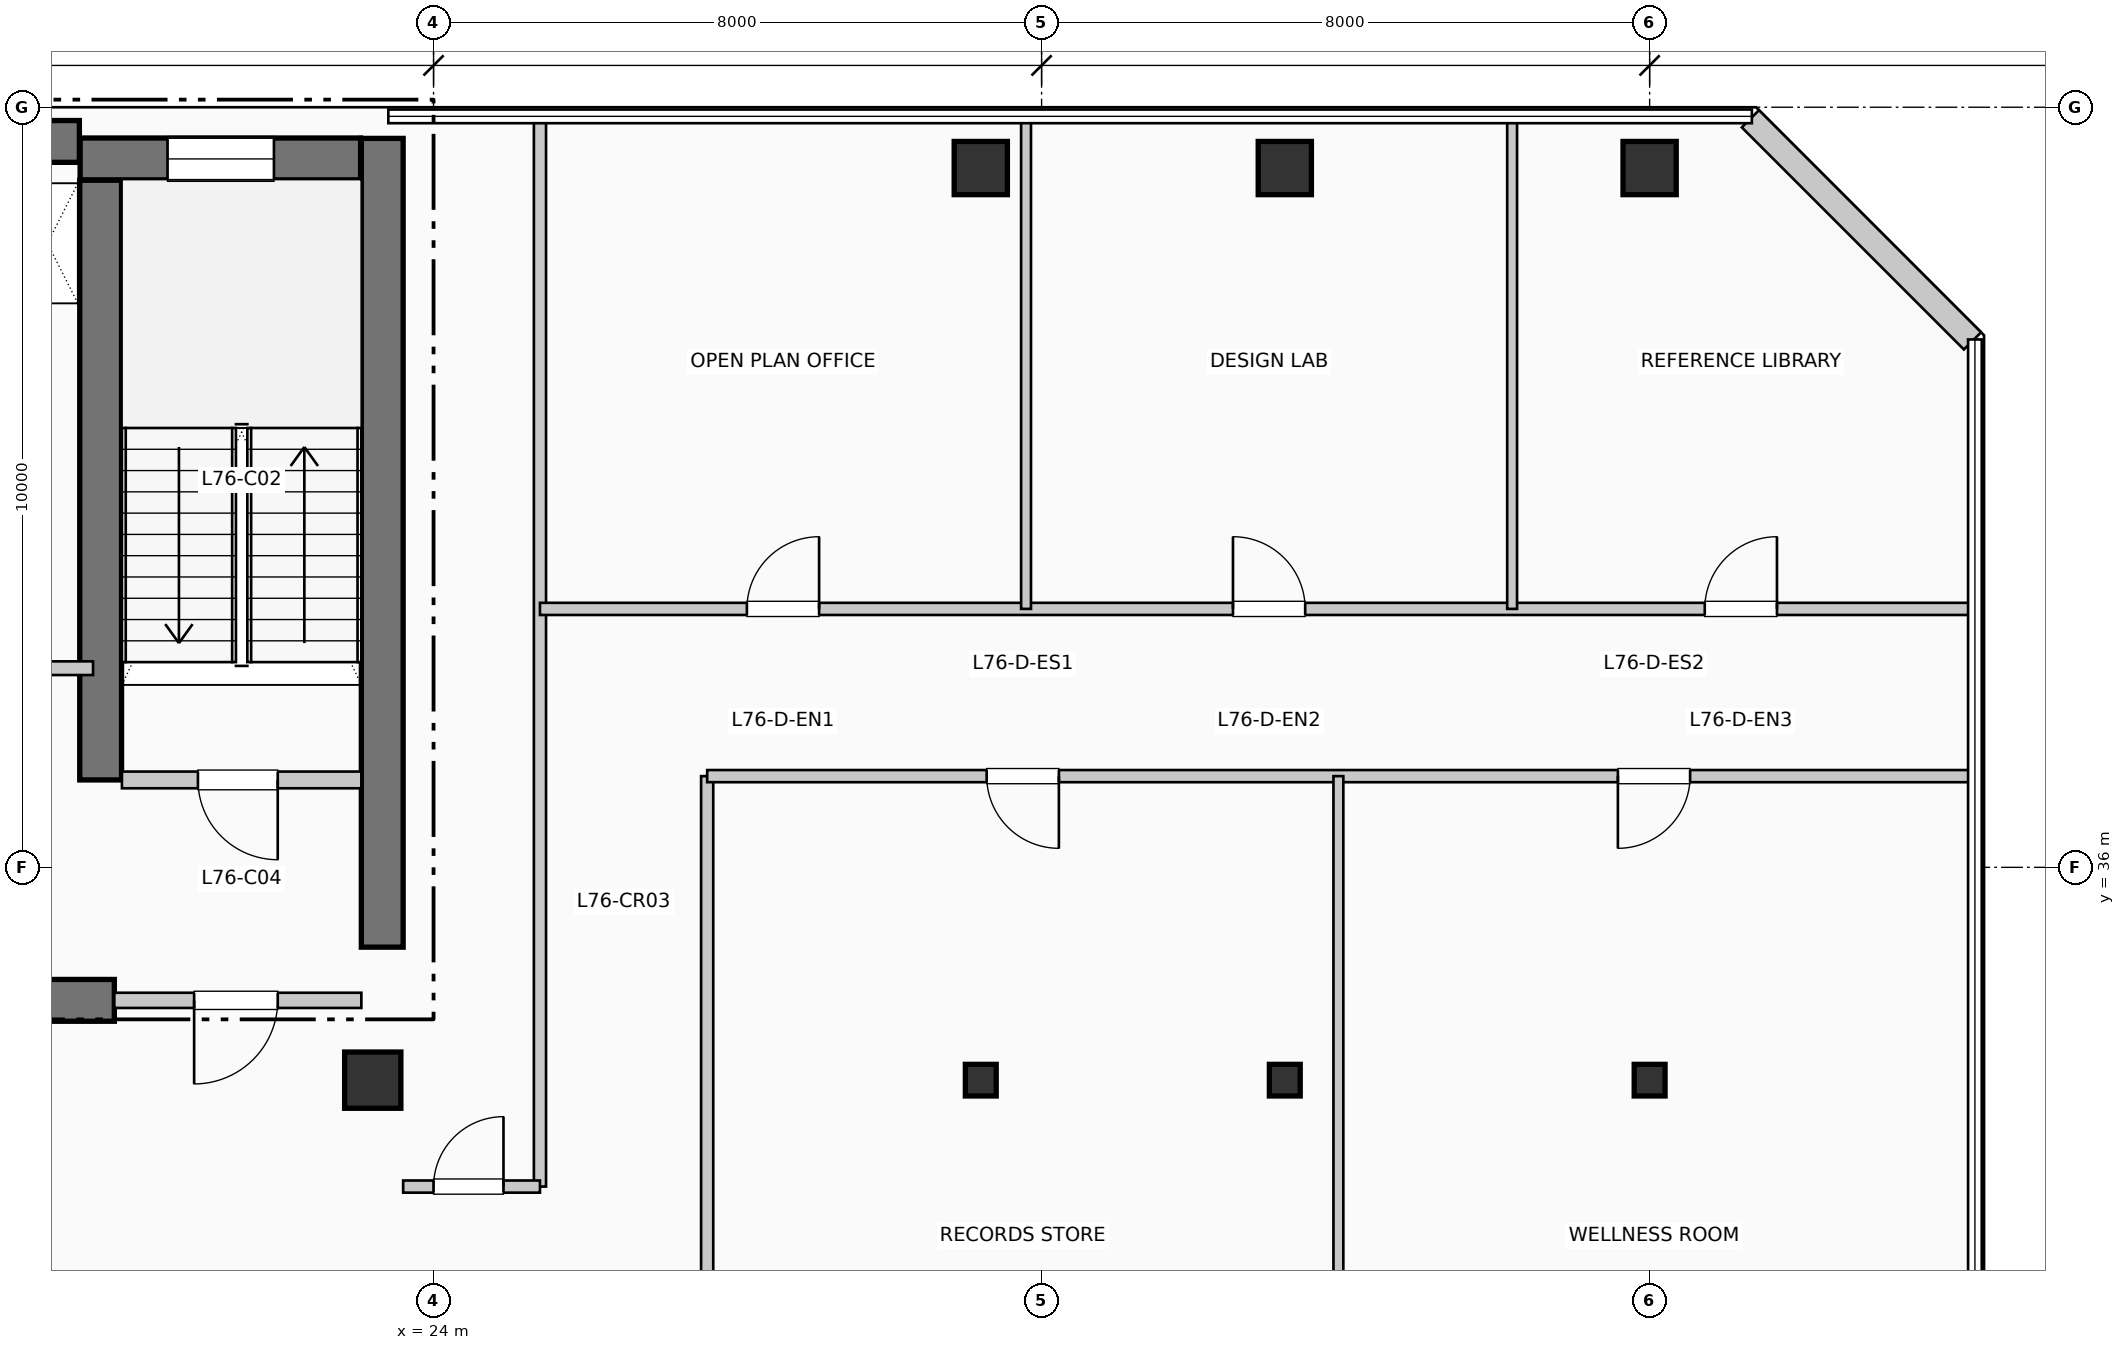
"""IFC4 building model, lengths in metres.
Left out: names, types, materials, properties, quantities, classifications, styles, units other than length and angle.
Written with IfcOpenShell. Run it as: python <this file> out.ifc"""

import sys

from ifc_helpers import new_model, si_unit, direction, frame, frame_2d, origin, origin_2d, place, context, subcontext, project, spatial, rectangle, i_section, extrude, element, fill, save


model = new_model("IFC4")
c1 = context("Model", 3, precision=1e-05, world=origin(), true_north=direction((0.0, 1.0)))
c2 = subcontext(c1, "Body", "Model", "MODEL_VIEW")
j1 = project(units=[si_unit("LENGTHUNIT", "METRE"), si_unit("PLANEANGLEUNIT", "RADIAN")], contexts=[c1])
p1 = place(None, origin())
s1 = spatial("IfcSite", under=j1, at=p1, CompositionType="ELEMENT")
p2 = place(p1, origin())
s2 = spatial("IfcBuilding", under=s1, at=p2, CompositionType="ELEMENT")
p3 = place(p2, frame((0.0, 0.0, 311.85)))
s3 = spatial("IfcBuildingStorey", under=s2, at=p3, CompositionType="ELEMENT", Elevation=311.85)
p4 = place(p3, frame((5.36, 45.55, 0.0), z_axis=(0.0, 0.0, 1.0), x_axis=(1.0, 0.0, 0.0)))
e1 = element("IfcWall", 1, at=p4, inside=s3, PredefinedType="SHEAR", context=c2, shape_type="SweptSolid", body=[
    extrude(rectangle(XDim=13.98, YDim=0.55, at=frame_2d((6.99, 0.0))), origin(), (0.0, 0.0, 1.0), 3.96),
])
p5 = place(p3, frame((23.325, 34.95, 0.0), z_axis=(0.0, 0.0, 1.0), x_axis=(0.0, 1.0, 0.0)))
e2 = element("IfcWall", 2, at=p5, inside=s3, PredefinedType="SHEAR", context=c2, shape_type="SweptSolid", body=[
    extrude(rectangle(XDim=10.64, YDim=0.55, at=frame_2d((5.32, 0.0))), origin(), (0.0, 0.0, 1.0), 3.96),
])
p6 = place(p3, frame((13.68, 34.25, 0.0), z_axis=(0.0, 0.0, 1.0), x_axis=(1.0, 0.0, 0.0)))
e3 = element("IfcWall", 3, at=p6, inside=s3, PredefinedType="SHEAR", context=c2, shape_type="SweptSolid", body=[
    extrude(rectangle(XDim=6.12, YDim=0.55, at=frame_2d((3.06, 0.0))), origin(), (0.0, 0.0, 1.0), 3.96),
])
p7 = place(p3, frame((19.62, 37.15, 0.0), z_axis=(0.0, 0.0, 1.0), x_axis=(0.0, 1.0, 0.0)))
e4 = element("IfcWall", 4, at=p7, inside=s3, PredefinedType="SHEAR", context=c2, shape_type="SweptSolid", body=[
    extrude(rectangle(XDim=7.89, YDim=0.55, at=frame_2d((3.945, 0.0))), origin(), (0.0, 0.0, 1.0), 3.96),
])
p8 = place(p3, frame((19.35, 45.32, 0.0), z_axis=(0.0, 0.0, 1.0), x_axis=(1.0, 0.0, 0.0)))
e5 = element("IfcWall", 5, at=p8, inside=s3, PredefinedType="SHEAR", context=c2, shape_type="SweptSolid", body=[
    extrude(rectangle(XDim=3.69, YDim=0.55, at=frame_2d((1.845, 0.0))), origin(), (0.0, 0.0, 1.0), 3.96),
])
p9 = place(p8, frame((1.15, 0.0, 1.05)))
e6 = element("IfcOpeningElement", 6, at=p9, cuts=e5, PredefinedType="OPENING", context=c2, shape_type="SweptSolid", body=[
    extrude(rectangle(XDim=1.4, YDim=1.8, at=frame_2d((0.7, 0.9))), frame((0.0, 0.285, 0.0), z_axis=(0.0, -1.0, 0.0), x_axis=(1.0, 0.0, 0.0)), (0.0, 0.0, 1.0), 0.57),
])
p10 = place(p3, frame((23.2, 33.2, 0.0), z_axis=(0.0, 0.0, 1.0), x_axis=(1.0, 0.0, 0.0)))
e7 = element("IfcColumn", 7, at=p10, inside=s3, PredefinedType="COLUMN", context=c2, shape_type="SweptSolid", body=[
    extrude(rectangle(XDim=0.74, YDim=0.74, at=origin_2d()), origin(), (0.0, 0.0, 1.0), 3.96),
])
p11 = place(p3, frame((31.2, 33.2, 0.0), z_axis=(0.0, 0.0, 1.0), x_axis=(1.0, 0.0, 0.0)))
e8 = element("IfcColumn", 8, at=p11, inside=s3, PredefinedType="COLUMN", context=c2, shape_type="SweptSolid", body=[
    extrude(i_section(OverallWidth=0.406, OverallDepth=0.416, WebThickness=0.022, FlangeThickness=0.036, at=origin_2d()), origin(), (0.0, 0.0, 1.0), 3.96),
])
p12 = place(p3, frame((31.2, 45.2, 0.0), z_axis=(0.0, 0.0, 1.0), x_axis=(1.0, 0.0, 0.0)))
e9 = element("IfcColumn", 9, at=p12, inside=s3, PredefinedType="COLUMN", context=c2, shape_type="SweptSolid", body=[
    extrude(rectangle(XDim=0.7, YDim=0.7, at=origin_2d()), origin(), (0.0, 0.0, 1.0), 3.96),
])
p13 = place(p3, frame((35.2, 33.2, 0.0), z_axis=(0.0, 0.0, 1.0), x_axis=(1.0, 0.0, 0.0)))
e10 = element("IfcColumn", 10, at=p13, inside=s3, PredefinedType="COLUMN", context=c2, shape_type="SweptSolid", body=[
    extrude(i_section(OverallWidth=0.406, OverallDepth=0.416, WebThickness=0.022, FlangeThickness=0.036, at=origin_2d()), origin(), (0.0, 0.0, 1.0), 3.96),
])
p14 = place(p3, frame((35.2, 45.2, 0.0), z_axis=(0.0, 0.0, 1.0), x_axis=(1.0, 0.0, 0.0)))
e11 = element("IfcColumn", 11, at=p14, inside=s3, PredefinedType="COLUMN", context=c2, shape_type="SweptSolid", body=[
    extrude(rectangle(XDim=0.7, YDim=0.7, at=origin_2d()), origin(), (0.0, 0.0, 1.0), 3.96),
])
p15 = place(p3, frame((40.0, 33.2, 0.0), z_axis=(0.0, 0.0, 1.0), x_axis=(1.0, 0.0, 0.0)))
e12 = element("IfcColumn", 12, at=p15, inside=s3, PredefinedType="COLUMN", context=c2, shape_type="SweptSolid", body=[
    extrude(i_section(OverallWidth=0.406, OverallDepth=0.416, WebThickness=0.022, FlangeThickness=0.036, at=origin_2d()), origin(), (0.0, 0.0, 1.0), 3.96),
])
p16 = place(p3, frame((40.0, 45.2, 0.0), z_axis=(0.0, 0.0, 1.0), x_axis=(1.0, 0.0, 0.0)))
e13 = element("IfcColumn", 13, at=p16, inside=s3, PredefinedType="COLUMN", context=c2, shape_type="SweptSolid", body=[
    extrude(rectangle(XDim=0.7, YDim=0.7, at=origin_2d()), origin(), (0.0, 0.0, 1.0), 3.96),
])
p17 = place(p3, frame((44.248, 42.926, 0.0), z_axis=(0.0, 0.0, 1.0), x_axis=(-0.707136318428, 0.707077242712, 0.0)))
e14 = element("IfcWall", 14, at=p17, inside=s3, PredefinedType="SOLIDWALL", context=c2, shape_type="SweptSolid", body=[
    extrude(rectangle(XDim=4.133, YDim=0.32, at=frame_2d((2.066, 0.0))), origin(), (0.0, 0.0, 1.0), 3.74),
])
p18 = place(p3, frame((19.9, 37.15, 0.0), z_axis=(0.0, 0.0, 1.0), x_axis=(1.0, 0.0, 0.0)))
e15 = element("IfcWall", 15, at=p18, inside=s3, PredefinedType="PARTITIONING", context=c2, shape_type="SweptSolid", body=[
    extrude(rectangle(XDim=3.15, YDim=0.22, at=frame_2d((1.575, 0.0))), origin(), (0.0, 0.0, 1.0), 3.74),
])
p19 = place(p18, frame((2.05, 0.0, 0.0), z_axis=(0.0, 0.0, 1.0), x_axis=(-1.0, 0.0, 0.0)))
e16 = element("IfcOpeningElement", 16, at=p19, cuts=e15, PredefinedType="OPENING", context=c2, shape_type="SweptSolid", body=[
    extrude(rectangle(XDim=1.05, YDim=2.15, at=frame_2d((0.525, 1.075))), frame((0.0, 0.12, 0.0), z_axis=(0.0, -1.0, 0.0), x_axis=(1.0, 0.0, 0.0)), (0.0, 0.0, 1.0), 0.24),
])
p20 = place(p3, frame((19.8, 34.25, 0.0), z_axis=(0.0, 0.0, 1.0), x_axis=(1.0, 0.0, 0.0)))
e17 = element("IfcWall", 17, at=p20, inside=s3, PredefinedType="PARTITIONING", context=c2, shape_type="SweptSolid", body=[
    extrude(rectangle(XDim=3.25, YDim=0.2, at=frame_2d((1.625, 0.0))), origin(), (0.0, 0.0, 1.0), 3.74),
])
p21 = place(p20, frame((2.15, 0.0, 0.0), z_axis=(0.0, 0.0, 1.0), x_axis=(-1.0, 0.0, 0.0)))
e18 = element("IfcOpeningElement", 18, at=p21, cuts=e17, PredefinedType="OPENING", context=c2, shape_type="SweptSolid", body=[
    extrude(rectangle(XDim=1.1, YDim=2.15, at=frame_2d((0.55, 1.075))), frame((0.0, 0.11, 0.0), z_axis=(0.0, -1.0, 0.0), x_axis=(1.0, 0.0, 0.0)), (0.0, 0.0, 1.0), 0.22),
])
p22 = place(p3, frame((17.68, 38.62, 0.0), z_axis=(0.0, 0.0, 1.0), x_axis=(1.0, 0.0, 0.0)))
e19 = element("IfcWall", 19, at=p22, inside=s3, PredefinedType="PARTITIONING", context=c2, shape_type="SweptSolid", body=[
    extrude(rectangle(XDim=1.84, YDim=0.18, at=frame_2d((0.92, 0.0))), origin(), (0.0, 0.0, 1.0), 3.74),
])
p23 = place(p22, frame((0.24, 0.0, 0.0)))
e20 = element("IfcOpeningElement", 20, at=p23, cuts=e19, PredefinedType="OPENING", context=c2, shape_type="SweptSolid", body=[
    extrude(rectangle(XDim=0.92, YDim=2.1, at=frame_2d((0.46, 1.05))), frame((0.0, 0.1, 0.0), z_axis=(0.0, -1.0, 0.0), x_axis=(1.0, 0.0, 0.0)), (0.0, 0.0, 1.0), 0.2),
])
p24 = place(p3, frame((25.4, 31.8, 0.0), z_axis=(0.0, 0.0, 1.0), x_axis=(0.0, 1.0, 0.0)))
e21 = element("IfcWall", 21, at=p24, inside=s3, PredefinedType="PARTITIONING", context=c2, shape_type="SweptSolid", body=[
    extrude(rectangle(XDim=14.01, YDim=0.16, at=frame_2d((7.005, 0.0))), origin(), (0.0, 0.0, 1.0), 3.74),
])
p25 = place(p3, frame((27.6, 25.19, 0.0), z_axis=(0.0, 0.0, 1.0), x_axis=(0.0, 1.0, 0.0)))
e22 = element("IfcWall", 22, at=p25, inside=s3, PredefinedType="PARTITIONING", context=c2, shape_type="SweptSolid", body=[
    extrude(rectangle(XDim=12.01, YDim=0.16, at=frame_2d((6.005, 0.0))), origin(), (0.0, 0.0, 1.0), 3.74),
])
p26 = place(p25, frame((2.15, 0.0, 0.0), z_axis=(0.0, 0.0, 1.0), x_axis=(-1.0, 0.0, 0.0)))
e23 = element("IfcOpeningElement", 23, at=p26, cuts=e22, PredefinedType="OPENING", context=c2, shape_type="SweptSolid", body=[
    extrude(rectangle(XDim=0.95, YDim=2.15, at=frame_2d((0.475, 1.075))), frame((0.0, 0.09, 0.0), z_axis=(0.0, -1.0, 0.0), x_axis=(1.0, 0.0, 0.0)), (0.0, 0.0, 1.0), 0.18),
])
p27 = place(p3, frame((27.6, 37.2, 0.0), z_axis=(0.0, 0.0, 1.0), x_axis=(1.0, 0.0, 0.0)))
e24 = element("IfcWall", 24, at=p27, inside=s3, PredefinedType="PARTITIONING", context=c2, shape_type="SweptSolid", body=[
    extrude(rectangle(XDim=16.61, YDim=0.16, at=frame_2d((8.305, 0.0))), origin(), (0.0, 0.0, 1.0), 3.74),
])
p28 = place(p27, frame((4.627, 0.0, 0.0), z_axis=(0.0, 0.0, 1.0), x_axis=(-1.0, 0.0, 0.0)))
e25 = element("IfcOpeningElement", 25, at=p28, cuts=e24, PredefinedType="OPENING", context=c2, shape_type="SweptSolid", body=[
    extrude(rectangle(XDim=0.95, YDim=2.15, at=frame_2d((0.475, 1.075))), frame((0.0, 0.09, 0.0), z_axis=(0.0, -1.0, 0.0), x_axis=(1.0, 0.0, 0.0)), (0.0, 0.0, 1.0), 0.18),
])
p29 = place(p27, frame((12.932, 0.0, 0.0), z_axis=(0.0, 0.0, 1.0), x_axis=(-1.0, 0.0, 0.0)))
e26 = element("IfcOpeningElement", 26, at=p29, cuts=e24, PredefinedType="OPENING", context=c2, shape_type="SweptSolid", body=[
    extrude(rectangle(XDim=0.95, YDim=2.15, at=frame_2d((0.475, 1.075))), frame((0.0, 0.09, 0.0), z_axis=(0.0, -1.0, 0.0), x_axis=(1.0, 0.0, 0.0)), (0.0, 0.0, 1.0), 0.18),
])
p30 = place(p3, frame((25.4, 39.4, 0.0), z_axis=(0.0, 0.0, 1.0), x_axis=(1.0, 0.0, 0.0)))
e27 = element("IfcWall", 27, at=p30, inside=s3, PredefinedType="PARTITIONING", context=c2, shape_type="SweptSolid", body=[
    extrude(rectangle(XDim=18.81, YDim=0.16, at=frame_2d((9.405, 0.0))), origin(), (0.0, 0.0, 1.0), 3.425),
])
p31 = place(p30, frame((2.723, 0.0, 0.0)))
e28 = element("IfcOpeningElement", 28, at=p31, cuts=e27, PredefinedType="OPENING", context=c2, shape_type="SweptSolid", body=[
    extrude(rectangle(XDim=0.95, YDim=2.15, at=frame_2d((0.475, 1.075))), frame((0.0, 0.09, 0.0), z_axis=(0.0, -1.0, 0.0), x_axis=(1.0, 0.0, 0.0)), (0.0, 0.0, 1.0), 0.18),
])
p32 = place(p30, frame((9.118, 0.0, 0.0)))
e29 = element("IfcOpeningElement", 29, at=p32, cuts=e27, PredefinedType="OPENING", context=c2, shape_type="SweptSolid", body=[
    extrude(rectangle(XDim=0.95, YDim=2.15, at=frame_2d((0.475, 1.075))), frame((0.0, 0.09, 0.0), z_axis=(0.0, -1.0, 0.0), x_axis=(1.0, 0.0, 0.0)), (0.0, 0.0, 1.0), 0.18),
])
p33 = place(p30, frame((15.325, 0.0, 0.0)))
e30 = element("IfcOpeningElement", 30, at=p33, cuts=e27, PredefinedType="OPENING", context=c2, shape_type="SweptSolid", body=[
    extrude(rectangle(XDim=0.95, YDim=2.15, at=frame_2d((0.475, 1.075))), frame((0.0, 0.09, 0.0), z_axis=(0.0, -1.0, 0.0), x_axis=(1.0, 0.0, 0.0)), (0.0, 0.0, 1.0), 0.18),
])
p34 = place(p3, frame((23.6, 31.8, 0.0), z_axis=(0.0, 0.0, 1.0), x_axis=(1.0, 0.0, 0.0)))
e31 = element("IfcWall", 31, at=p34, inside=s3, PredefinedType="PARTITIONING", context=c2, shape_type="SweptSolid", body=[
    extrude(rectangle(XDim=1.8, YDim=0.16, at=frame_2d((0.9, 0.0))), origin(), (0.0, 0.0, 1.0), 3.74),
])
p35 = place(p34, frame((0.4, 0.0, 0.0)))
e32 = element("IfcOpeningElement", 32, at=p35, cuts=e31, PredefinedType="OPENING", context=c2, shape_type="SweptSolid", body=[
    extrude(rectangle(XDim=0.92, YDim=2.1, at=frame_2d((0.46, 1.05))), frame((0.0, 0.09, 0.0), z_axis=(0.0, -1.0, 0.0), x_axis=(1.0, 0.0, 0.0)), (0.0, 0.0, 1.0), 0.18),
])
p36 = place(p3, frame((35.905, 25.19, 0.0), z_axis=(0.0, 0.0, 1.0), x_axis=(0.0, 1.0, 0.0)))
e33 = element("IfcWall", 33, at=p36, inside=s3, PredefinedType="PARTITIONING", context=c2, shape_type="SweptSolid", body=[
    extrude(rectangle(XDim=12.01, YDim=0.13, at=frame_2d((6.005, 0.0))), origin(), (0.0, 0.0, 1.0), 3.74),
])
for number, where, z_axis, x_axis in (
    (34, (31.795, 39.4, 0.0), (0.0, 0.0, 1.0), (0.0, 1.0, 0.0)),
    (35, (38.191, 39.4, 0.0), (0.0, 0.0, 1.0), (0.0, 1.0, 0.0)),
):
    element("IfcWall", number, at=place(p3, frame(where, z_axis=z_axis, x_axis=x_axis)), inside=s3, PredefinedType="PARTITIONING", context=c2, shape_type="SweptSolid", body=[
        extrude(rectangle(XDim=6.41, YDim=0.13, at=frame_2d((3.205, 0.0))), origin(), (0.0, 0.0, 1.0), 3.74),
    ])
p37 = place(p9, origin())
e36 = element("IfcWindow", 36, at=p37, inside=s3, PartitioningType="SINGLE_PANEL", PredefinedType="WINDOW", context=c2, shape_type="SweptSolid", body=[
    extrude(rectangle(XDim=1.4, YDim=1.8, at=frame_2d((0.7, 0.9))), frame((0.0, 0.03, 0.0), z_axis=(0.0, -1.0, 0.0), x_axis=(1.0, 0.0, 0.0)), (0.0, 0.0, 1.0), 0.06),
])
fill(e6, e36)
p38 = place(p19, origin())
e37 = element("IfcDoor", 37, at=p38, inside=s3, OperationType="SINGLE_SWING_RIGHT", PredefinedType="DOOR", context=c2, shape_type="SweptSolid", body=[
    extrude(rectangle(XDim=1.05, YDim=2.15, at=frame_2d((0.525, 1.075))), frame((0.0, 0.025, 0.0), z_axis=(0.0, -1.0, 0.0), x_axis=(1.0, 0.0, 0.0)), (0.0, 0.0, 1.0), 0.05),
])
fill(e16, e37)
p39 = place(p21, origin())
e38 = element("IfcDoor", 38, at=p39, inside=s3, OperationType="SINGLE_SWING_LEFT", PredefinedType="DOOR", context=c2, shape_type="SweptSolid", body=[
    extrude(rectangle(XDim=1.1, YDim=2.15, at=frame_2d((0.55, 1.075))), frame((0.0, 0.025, 0.0), z_axis=(0.0, -1.0, 0.0), x_axis=(1.0, 0.0, 0.0)), (0.0, 0.0, 1.0), 0.05),
])
fill(e18, e38)
p40 = place(p35, origin())
e39 = element("IfcDoor", 39, at=p40, inside=s3, OperationType="SINGLE_SWING_RIGHT", PredefinedType="DOOR", context=c2, shape_type="SweptSolid", body=[
    extrude(rectangle(XDim=0.92, YDim=2.1, at=frame_2d((0.46, 1.05))), frame((0.0, 0.025, 0.0), z_axis=(0.0, -1.0, 0.0), x_axis=(1.0, 0.0, 0.0)), (0.0, 0.0, 1.0), 0.05),
])
fill(e32, e39)
p41 = place(p28, origin())
e40 = element("IfcDoor", 40, at=p41, inside=s3, OperationType="SINGLE_SWING_RIGHT", PredefinedType="DOOR", context=c2, shape_type="SweptSolid", body=[
    extrude(rectangle(XDim=0.95, YDim=2.15, at=frame_2d((0.475, 1.075))), frame((0.0, 0.025, 0.0), z_axis=(0.0, -1.0, 0.0), x_axis=(1.0, 0.0, 0.0)), (0.0, 0.0, 1.0), 0.05),
])
fill(e25, e40)
p42 = place(p29, origin())
e41 = element("IfcDoor", 41, at=p42, inside=s3, OperationType="SINGLE_SWING_LEFT", PredefinedType="DOOR", context=c2, shape_type="SweptSolid", body=[
    extrude(rectangle(XDim=0.95, YDim=2.15, at=frame_2d((0.475, 1.075))), frame((0.0, 0.025, 0.0), z_axis=(0.0, -1.0, 0.0), x_axis=(1.0, 0.0, 0.0)), (0.0, 0.0, 1.0), 0.05),
])
fill(e26, e41)
p43 = place(p31, origin())
e42 = element("IfcDoor", 42, at=p43, inside=s3, OperationType="SINGLE_SWING_RIGHT", PredefinedType="DOOR", context=c2, shape_type="SweptSolid", body=[
    extrude(rectangle(XDim=0.95, YDim=2.15, at=frame_2d((0.475, 1.075))), frame((0.0, 0.025, 0.0), z_axis=(0.0, -1.0, 0.0), x_axis=(1.0, 0.0, 0.0)), (0.0, 0.0, 1.0), 0.05),
])
fill(e28, e42)
p44 = place(p32, origin())
e43 = element("IfcDoor", 43, at=p44, inside=s3, OperationType="SINGLE_SWING_LEFT", PredefinedType="DOOR", context=c2, shape_type="SweptSolid", body=[
    extrude(rectangle(XDim=0.95, YDim=2.15, at=frame_2d((0.475, 1.075))), frame((0.0, 0.025, 0.0), z_axis=(0.0, -1.0, 0.0), x_axis=(1.0, 0.0, 0.0)), (0.0, 0.0, 1.0), 0.05),
])
fill(e29, e43)
p45 = place(p33, origin())
e44 = element("IfcDoor", 44, at=p45, inside=s3, OperationType="SINGLE_SWING_RIGHT", PredefinedType="DOOR", context=c2, shape_type="SweptSolid", body=[
    extrude(rectangle(XDim=0.95, YDim=2.15, at=frame_2d((0.475, 1.075))), frame((0.0, 0.025, 0.0), z_axis=(0.0, -1.0, 0.0), x_axis=(1.0, 0.0, 0.0)), (0.0, 0.0, 1.0), 0.05),
])
fill(e30, e44)
save(model, sys.argv[1])
